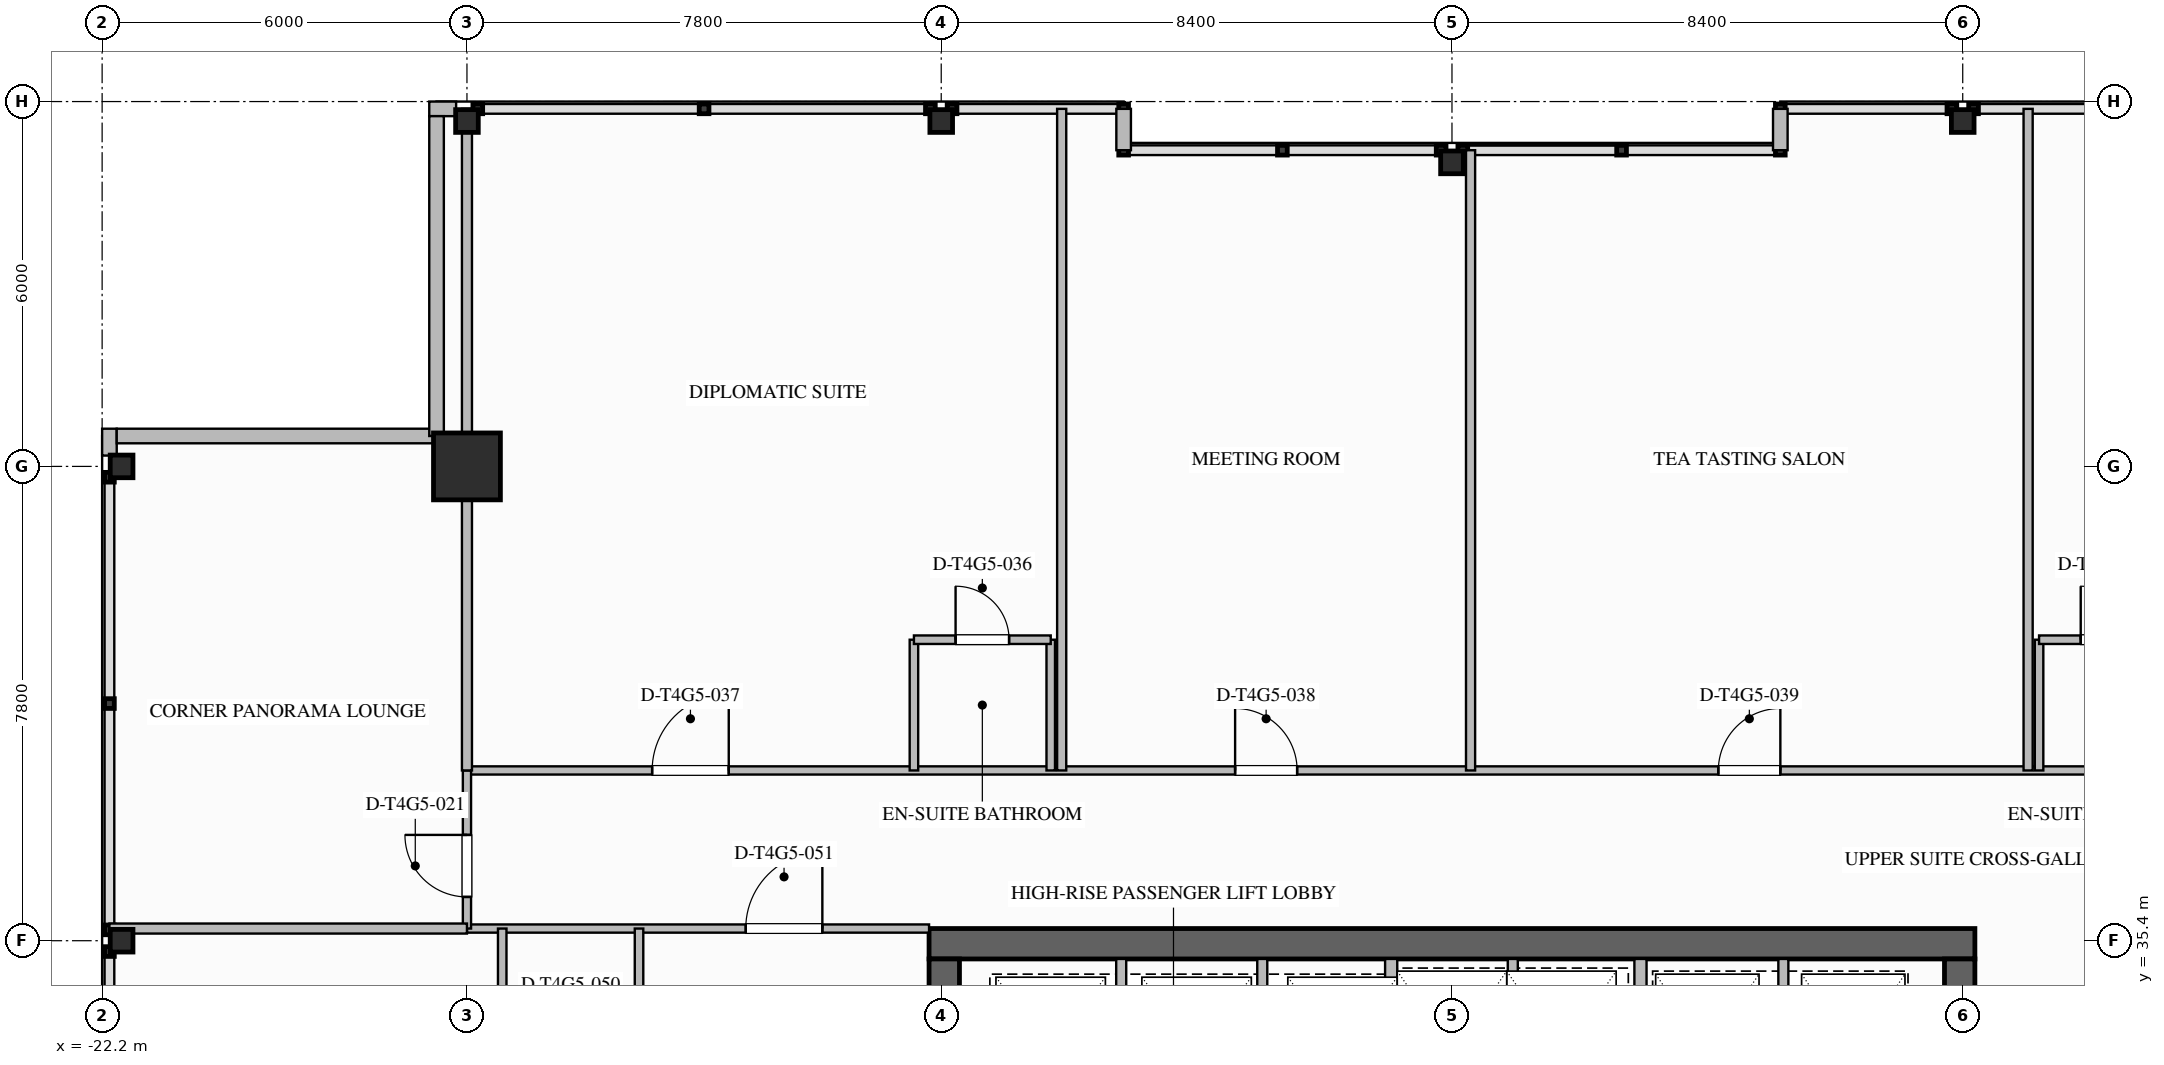
"""IFC4 building model, lengths in metres.
Left out: names, types, materials, properties, quantities, classifications, styles, units other than length and angle.
Written with IfcOpenShell. Run it as: python <this file> out.ifc"""

import sys

from ifc_helpers import new_model, si_unit, direction, frame, frame_2d, origin, origin_2d, place, context, subcontext, project, spatial, rectangle, i_section, extrude, element, fill, save


model = new_model("IFC4")
c1 = context("Model", 3, precision=1e-05, world=origin(), true_north=direction((0.0, 1.0)))
c2 = subcontext(c1, "Body", "Model", "MODEL_VIEW")
j1 = project(units=[si_unit("LENGTHUNIT", "METRE"), si_unit("PLANEANGLEUNIT", "RADIAN")], contexts=[c1])
p1 = place(None, origin())
s1 = spatial("IfcSite", under=j1, at=p1, CompositionType="ELEMENT")
p2 = place(p1, origin())
s2 = spatial("IfcBuilding", under=s1, at=p2, CompositionType="ELEMENT")
p3 = place(p2, frame((0.0, 0.0, 248.3)))
s3 = spatial("IfcBuildingStorey", under=s2, at=p3, CompositionType="ELEMENT", Elevation=248.3)
p4 = place(p3, frame((-8.6, 35.35, 0.0), z_axis=(0.0, 0.0, 1.0), x_axis=(1.0, 0.0, 0.0)))
e1 = element("IfcWall", 1, at=p4, inside=s3, PredefinedType="SHEAR", context=c2, shape_type="SweptSolid", body=[
    extrude(rectangle(XDim=17.2, YDim=0.5, at=frame_2d((8.6, 0.0))), origin(), (0.0, 0.0, 1.0), 3.6),
])
p5 = place(p3, frame((8.35, 35.1, 0.0), z_axis=(0.0, 0.0, 1.0), x_axis=(0.0, -1.0, 0.0)))
e2 = element("IfcWall", 2, at=p5, inside=s3, PredefinedType="SHEAR", context=c2, shape_type="SweptSolid", body=[
    extrude(rectangle(XDim=16.2, YDim=0.5, at=frame_2d((8.1, 0.0))), origin(), (0.0, 0.0, 1.0), 3.6),
])
p6 = place(p5, frame((3.08, 0.0, 0.0)))
e3 = element("IfcOpeningElement", 3, at=p6, cuts=e2, PredefinedType="OPENING", context=c2, shape_type="SweptSolid", body=[
    extrude(rectangle(XDim=1.12, YDim=2.1, at=frame_2d((0.56, 1.05))), frame((0.0, 0.26, 0.0), z_axis=(0.0, -1.0, 0.0), x_axis=(1.0, 0.0, 0.0)), (0.0, 0.0, 1.0), 0.52),
])
p7 = place(p5, frame((10.62, 0.0, 0.0)))
e4 = element("IfcOpeningElement", 4, at=p7, cuts=e2, PredefinedType="OPENING", context=c2, shape_type="SweptSolid", body=[
    extrude(rectangle(XDim=1.08, YDim=2.04, at=frame_2d((0.54, 1.02))), frame((0.0, 0.26, 0.0), z_axis=(0.0, -1.0, 0.0), x_axis=(1.0, 0.0, 0.0)), (0.0, 0.0, 1.0), 0.52),
])
p8 = place(p3, frame((-8.35, 18.9, 0.0), z_axis=(0.0, 0.0, 1.0), x_axis=(0.0, 1.0, 0.0)))
e5 = element("IfcWall", 5, at=p8, inside=s3, PredefinedType="SHEAR", context=c2, shape_type="SweptSolid", body=[
    extrude(rectangle(XDim=16.2, YDim=0.5, at=frame_2d((8.1, 0.0))), origin(), (0.0, 0.0, 1.0), 3.6),
])
p9 = place(p3, frame((-16.2, 43.2, 0.0), z_axis=(0.0, 0.0, 1.0), x_axis=(1.0, 0.0, 0.0)))
e6 = element("IfcColumn", 6, at=p9, inside=s3, PredefinedType="COLUMN", context=c2, shape_type="SweptSolid", body=[
    extrude(rectangle(XDim=1.1, YDim=1.1, at=origin_2d()), origin(), (0.0, 0.0, 1.0), 3.6),
])
for number, where, z_axis, x_axis in (
    (7, (-21.88, 35.4, 0.0), (0.0, 0.0, 1.0), (1.0, 0.0, 0.0)),
    (8, (-21.88, 43.2, 0.0), (0.0, 0.0, 1.0), (1.0, 0.0, 0.0)),
    (9, (-16.2, 48.88, 0.0), (0.0, 0.0, 1.0), (0.0, 1.0, 0.0)),
    (10, (-8.4, 48.88, 0.0), (0.0, 0.0, 1.0), (0.0, 1.0, 0.0)),
    (11, (0.0, 48.2, 0.0), (0.0, 0.0, 1.0), (0.0, 1.0, 0.0)),
    (12, (8.4, 48.88, 0.0), (0.0, 0.0, 1.0), (0.0, 1.0, 0.0)),
):
    element("IfcColumn", number, at=place(p3, frame(where, z_axis=z_axis, x_axis=x_axis)), inside=s3, PredefinedType="COLUMN", context=c2, shape_type="SweptSolid", body=[
        extrude(i_section(OverallWidth=0.374, OverallDepth=0.372, WebThickness=0.016, FlangeThickness=0.026, FilletRadius=0.025, at=origin_2d()), origin(), (0.0, 0.0, 1.0), 3.597),
    ])
for number, where, z_axis, x_axis in (
    (13, (-22.08, 43.378, 0.0), (0.0, 0.0, 1.0), (0.0, 1.0, 0.0)),
    (14, (-16.82, 49.08, 0.0), (0.0, 0.0, 1.0), (1.0, 0.0, 0.0)),
):
    element("IfcWall", number, at=place(p3, frame(where, z_axis=z_axis, x_axis=x_axis)), inside=s3, PredefinedType="STANDARD", context=c2, shape_type="SweptSolid", body=[
        extrude(rectangle(XDim=0.442, YDim=0.24, at=frame_2d((0.221, 0.0))), origin(), (0.0, 0.0, 1.0), 3.34),
    ])
for number, where, z_axis, x_axis in (
    (15, (-21.96, 43.7, 0.0), (0.0, 0.0, 1.0), (1.0, 0.0, 0.0)),
    (16, (-16.7, 43.7, 0.0), (0.0, 0.0, 1.0), (0.0, 1.0, 0.0)),
):
    element("IfcWall", number, at=place(p3, frame(where, z_axis=z_axis, x_axis=x_axis)), inside=s3, PredefinedType="STANDARD", context=c2, shape_type="SweptSolid", body=[
        extrude(rectangle(XDim=5.26, YDim=0.24, at=frame_2d((2.63, 0.0))), origin(), (0.0, 0.0, 1.0), 3.34),
    ])
for number, where, z_axis, x_axis in (
    (17, (-5.4, 49.08, 0.0), (0.0, 0.0, 1.0), (0.0, -1.0, 0.0)),
    (18, (5.4, 48.4, 0.0), (0.0, 0.0, 1.0), (0.0, 1.0, 0.0)),
):
    element("IfcWall", number, at=place(p3, frame(where, z_axis=z_axis, x_axis=x_axis)), inside=s3, PredefinedType="STANDARD", context=c2, shape_type="SweptSolid", body=[
        extrude(rectangle(XDim=0.68, YDim=0.24, at=frame_2d((0.34, 0.0))), origin(), (0.0, 0.0, 1.0), 3.34),
    ])
p10 = place(p3, frame((3.1, 32.22, 0.0), z_axis=(0.0, 0.0, 1.0), x_axis=(0.0, 1.0, 0.0)))
e19 = element("IfcWall", 19, at=p10, inside=s3, PredefinedType="SOLIDWALL", context=c2, shape_type="SweptSolid", body=[
    extrude(rectangle(XDim=2.88, YDim=0.2, at=frame_2d((1.44, 0.0))), origin(), (0.0, 0.0, 1.0), 3.34),
])
p11 = place(p3, frame((5.45, 32.22, 0.0), z_axis=(0.0, 0.0, 1.0), x_axis=(0.0, 1.0, 0.0)))
e20 = element("IfcWall", 20, at=p11, inside=s3, PredefinedType="PARTITIONING", context=c2, shape_type="SweptSolid", body=[
    extrude(rectangle(XDim=2.88, YDim=0.165, at=frame_2d((1.44, 0.0))), origin(), (0.0, 0.0, 1.0), 3.34),
])
p12 = place(p3, frame((-1.0, 32.18, 0.0), z_axis=(0.0, 0.0, 1.0), x_axis=(0.0, 1.0, 0.0)))
e21 = element("IfcWall", 21, at=p12, inside=s3, PredefinedType="SOLIDWALL", context=c2, shape_type="SweptSolid", body=[
    extrude(rectangle(XDim=2.92, YDim=0.2, at=frame_2d((1.46, 0.0))), origin(), (0.0, 0.0, 1.0), 3.34),
])
p13 = place(p3, frame((1.0, 32.18, 0.0), z_axis=(0.0, 0.0, 1.0), x_axis=(0.0, 1.0, 0.0)))
e22 = element("IfcWall", 22, at=p13, inside=s3, PredefinedType="PARTITIONING", context=c2, shape_type="SweptSolid", body=[
    extrude(rectangle(XDim=2.92, YDim=0.165, at=frame_2d((1.46, 0.0))), origin(), (0.0, 0.0, 1.0), 3.34),
])
for number, where, z_axis, x_axis in (
    (23, (-5.44, 32.22, 0.0), (0.0, 0.0, 1.0), (0.0, 1.0, 0.0)),
    (24, (-3.12, 32.22, 0.0), (0.0, 0.0, 1.0), (0.0, 1.0, 0.0)),
):
    element("IfcWall", number, at=place(p3, frame(where, z_axis=z_axis, x_axis=x_axis)), inside=s3, PredefinedType="PARTITIONING", context=c2, shape_type="SweptSolid", body=[
        extrude(rectangle(XDim=2.88, YDim=0.165, at=frame_2d((1.44, 0.0))), origin(), (0.0, 0.0, 1.0), 3.34),
    ])
p14 = place(p3, frame((-16.2, 38.2, 0.0), z_axis=(0.0, 0.0, 1.0), x_axis=(1.0, 0.0, 0.0)))
e25 = element("IfcWall", 25, at=p14, inside=s3, PredefinedType="PARTITIONING", context=c2, shape_type="SweptSolid", body=[
    extrude(rectangle(XDim=38.28, YDim=0.135, at=frame_2d((19.14, 0.0))), origin(), (0.0, 0.0, 1.0), 3.34),
])
p15 = place(p14, frame((35.785, 0.0, 0.0)))
e26 = element("IfcOpeningElement", 26, at=p15, cuts=e25, PredefinedType="OPENING", context=c2, shape_type="SweptSolid", body=[
    extrude(rectangle(XDim=1.26, YDim=2.2, at=frame_2d((0.63, 1.1))), frame((0.0, 0.077, 0.0), z_axis=(0.0, -1.0, 0.0), x_axis=(1.0, 0.0, 0.0)), (0.0, 0.0, 1.0), 0.155),
])
p16 = place(p14, frame((3.046, 0.0, 0.0)))
e27 = element("IfcOpeningElement", 27, at=p16, cuts=e25, PredefinedType="OPENING", context=c2, shape_type="SweptSolid", body=[
    extrude(rectangle(XDim=1.26, YDim=2.2, at=frame_2d((0.63, 1.1))), frame((0.0, 0.077, 0.0), z_axis=(0.0, -1.0, 0.0), x_axis=(1.0, 0.0, 0.0)), (0.0, 0.0, 1.0), 0.155),
])
p17 = place(p14, frame((12.633, 0.0, 0.0)))
e28 = element("IfcOpeningElement", 28, at=p17, cuts=e25, PredefinedType="OPENING", context=c2, shape_type="SweptSolid", body=[
    extrude(rectangle(XDim=1.02, YDim=2.15, at=frame_2d((0.51, 1.075))), frame((0.0, 0.077, 0.0), z_axis=(0.0, -1.0, 0.0), x_axis=(1.0, 0.0, 0.0)), (0.0, 0.0, 1.0), 0.155),
])
p18 = place(p14, frame((20.581, 0.0, 0.0)))
e29 = element("IfcOpeningElement", 29, at=p18, cuts=e25, PredefinedType="OPENING", context=c2, shape_type="SweptSolid", body=[
    extrude(rectangle(XDim=1.02, YDim=2.15, at=frame_2d((0.51, 1.075))), frame((0.0, 0.077, 0.0), z_axis=(0.0, -1.0, 0.0), x_axis=(1.0, 0.0, 0.0)), (0.0, 0.0, 1.0), 0.155),
])
p19 = place(p14, frame((29.623, 0.0, 0.0)))
e30 = element("IfcOpeningElement", 30, at=p19, cuts=e25, PredefinedType="OPENING", context=c2, shape_type="SweptSolid", body=[
    extrude(rectangle(XDim=1.26, YDim=2.2, at=frame_2d((0.63, 1.1))), frame((0.0, 0.077, 0.0), z_axis=(0.0, -1.0, 0.0), x_axis=(1.0, 0.0, 0.0)), (0.0, 0.0, 1.0), 0.155),
])
p20 = place(p3, frame((-16.2, 35.6, 0.0), z_axis=(0.0, 0.0, 1.0), x_axis=(1.0, 0.0, 0.0)))
e31 = element("IfcWall", 31, at=p20, inside=s3, PredefinedType="PARTITIONING", context=c2, shape_type="SweptSolid", body=[
    extrude(rectangle(XDim=7.6, YDim=0.135, at=frame_2d((3.8, 0.0))), origin(), (0.0, 0.0, 1.0), 2.717),
])
p21 = place(p20, frame((4.585, 0.0, 0.0)))
e32 = element("IfcOpeningElement", 32, at=p21, cuts=e31, PredefinedType="OPENING", context=c2, shape_type="SweptSolid", body=[
    extrude(rectangle(XDim=1.26, YDim=2.2, at=frame_2d((0.63, 1.1))), frame((0.0, 0.077, 0.0), z_axis=(0.0, -1.0, 0.0), x_axis=(1.0, 0.0, 0.0)), (0.0, 0.0, 1.0), 0.155),
])
p22 = place(p3, frame((-16.2, 35.6, 0.0), z_axis=(0.0, 0.0, 1.0), x_axis=(0.0, 1.0, 0.0)))
e33 = element("IfcWall", 33, at=p22, inside=s3, PredefinedType="PARTITIONING", context=c2, shape_type="SweptSolid", body=[
    extrude(rectangle(XDim=2.6, YDim=0.135, at=frame_2d((1.3, 0.0))), origin(), (0.0, 0.0, 1.0), 2.714),
])
p23 = place(p22, frame((0.52, 0.0, 0.0)))
e34 = element("IfcOpeningElement", 34, at=p23, cuts=e33, PredefinedType="OPENING", context=c2, shape_type="SweptSolid", body=[
    extrude(rectangle(XDim=1.02, YDim=2.15, at=frame_2d((0.51, 1.075))), frame((0.0, 0.077, 0.0), z_axis=(0.0, -1.0, 0.0), x_axis=(1.0, 0.0, 0.0)), (0.0, 0.0, 1.0), 0.155),
])
p24 = place(p3, frame((-16.2, 38.2, 0.0), z_axis=(0.0, 0.0, 1.0), x_axis=(0.0, 1.0, 0.0)))
e35 = element("IfcWall", 35, at=p24, inside=s3, PredefinedType="PARTITIONING", context=c2, shape_type="SweptSolid", body=[
    extrude(rectangle(XDim=10.88, YDim=0.165, at=frame_2d((5.44, 0.0))), origin(), (0.0, 0.0, 1.0), 2.714),
])
p25 = place(p3, frame((-22.08, 35.6, 0.0), z_axis=(0.0, 0.0, 1.0), x_axis=(1.0, 0.0, 0.0)))
e36 = element("IfcWall", 36, at=p25, inside=s3, PredefinedType="PARTITIONING", context=c2, shape_type="SweptSolid", body=[
    extrude(rectangle(XDim=5.88, YDim=0.165, at=frame_2d((2.94, 0.0))), origin(), (0.0, 0.0, 1.0), 2.714),
])
for number, where, z_axis, x_axis in (
    (37, (-8.849, 38.2, 0.0), (0.0, 0.0, 1.0), (0.0, 1.0, 0.0)),
    (38, (-6.599, 38.2, 0.0), (0.0, 0.0, 1.0), (0.0, 1.0, 0.0)),
):
    element("IfcWall", number, at=place(p3, frame(where, z_axis=z_axis, x_axis=x_axis)), inside=s3, PredefinedType="PLUMBINGWALL", context=c2, shape_type="SweptSolid", body=[
        extrude(rectangle(XDim=2.15, YDim=0.14, at=frame_2d((1.075, 0.0))), origin(), (0.0, 0.0, 1.0), 3.34),
    ])
p26 = place(p3, frame((-8.849, 40.35, 0.0), z_axis=(0.0, 0.0, 1.0), x_axis=(1.0, 0.0, 0.0)))
e39 = element("IfcWall", 39, at=p26, inside=s3, PredefinedType="PLUMBINGWALL", context=c2, shape_type="SweptSolid", body=[
    extrude(rectangle(XDim=2.25, YDim=0.14, at=frame_2d((1.125, 0.0))), origin(), (0.0, 0.0, 1.0), 3.34),
])
p27 = place(p26, frame((0.685, 0.0, 0.0)))
e40 = element("IfcOpeningElement", 40, at=p27, cuts=e39, PredefinedType="OPENING", context=c2, shape_type="SweptSolid", body=[
    extrude(rectangle(XDim=0.88, YDim=2.1, at=frame_2d((0.44, 1.05))), frame((0.0, 0.08, 0.0), z_axis=(0.0, -1.0, 0.0), x_axis=(1.0, 0.0, 0.0)), (0.0, 0.0, 1.0), 0.16),
])
p28 = place(p3, frame((-6.419, 38.2, 0.0), z_axis=(0.0, 0.0, 1.0), x_axis=(0.0, 1.0, 0.0)))
e41 = element("IfcWall", 41, at=p28, inside=s3, PredefinedType="PARTITIONING", context=c2, shape_type="SweptSolid", body=[
    extrude(rectangle(XDim=10.88, YDim=0.15, at=frame_2d((5.44, 0.0))), origin(), (0.0, 0.0, 1.0), 3.34),
])
p29 = place(p3, frame((0.306, 38.2, 0.0), z_axis=(0.0, 0.0, 1.0), x_axis=(0.0, 1.0, 0.0)))
e42 = element("IfcWall", 42, at=p29, inside=s3, PredefinedType="PARTITIONING", context=c2, shape_type="SweptSolid", body=[
    extrude(rectangle(XDim=10.2, YDim=0.15, at=frame_2d((5.1, 0.0))), origin(), (0.0, 0.0, 1.0), 2.714),
])
p30 = place(p3, frame((9.476, 38.2, 0.0), z_axis=(0.0, 0.0, 1.0), x_axis=(0.0, 1.0, 0.0)))
e43 = element("IfcWall", 43, at=p30, inside=s3, PredefinedType="PARTITIONING", context=c2, shape_type="SweptSolid", body=[
    extrude(rectangle(XDim=10.88, YDim=0.15, at=frame_2d((5.44, 0.0))), origin(), (0.0, 0.0, 1.0), 3.34),
])
p31 = place(p3, frame((9.656, 38.2, 0.0), z_axis=(0.0, 0.0, 1.0), x_axis=(0.0, 1.0, 0.0)))
e44 = element("IfcWall", 44, at=p31, inside=s3, PredefinedType="PLUMBINGWALL", context=c2, shape_type="SweptSolid", body=[
    extrude(rectangle(XDim=2.15, YDim=0.14, at=frame_2d((1.075, 0.0))), origin(), (0.0, 0.0, 1.0), 3.34),
])
p32 = place(p3, frame((9.656, 40.35, 0.0), z_axis=(0.0, 0.0, 1.0), x_axis=(1.0, 0.0, 0.0)))
e45 = element("IfcWall", 45, at=p32, inside=s3, PredefinedType="PLUMBINGWALL", context=c2, shape_type="SweptSolid", body=[
    extrude(rectangle(XDim=2.25, YDim=0.14, at=frame_2d((1.125, 0.0))), origin(), (0.0, 0.0, 1.0), 3.34),
])
p33 = place(p32, frame((0.685, 0.0, 0.0)))
e46 = element("IfcOpeningElement", 46, at=p33, cuts=e45, PredefinedType="OPENING", context=c2, shape_type="SweptSolid", body=[
    extrude(rectangle(XDim=0.88, YDim=2.1, at=frame_2d((0.44, 1.05))), frame((0.0, 0.08, 0.0), z_axis=(0.0, -1.0, 0.0), x_axis=(1.0, 0.0, 0.0)), (0.0, 0.0, 1.0), 0.16),
])
for number, where, z_axis, x_axis in (
    (47, (-15.62, 35.6, 0.0), (0.0, 0.0, 1.0), (0.0, -1.0, 0.0)),
    (48, (-13.37, 35.6, 0.0), (0.0, 0.0, 1.0), (0.0, -1.0, 0.0)),
):
    element("IfcWall", number, at=place(p3, frame(where, z_axis=z_axis, x_axis=x_axis)), inside=s3, PredefinedType="PLUMBINGWALL", context=c2, shape_type="SweptSolid", body=[
        extrude(rectangle(XDim=2.15, YDim=0.14, at=frame_2d((1.075, 0.0))), origin(), (0.0, 0.0, 1.0), 3.34),
    ])
p34 = place(p23, origin())
e49 = element("IfcDoor", 49, at=p34, inside=s3, OperationType="SINGLE_SWING_RIGHT", PredefinedType="DOOR", context=c2, shape_type="SweptSolid", body=[
    extrude(rectangle(XDim=1.02, YDim=2.15, at=frame_2d((0.51, 1.075))), frame((0.0, 0.025, 0.0), z_axis=(0.0, -1.0, 0.0), x_axis=(1.0, 0.0, 0.0)), (0.0, 0.0, 1.0), 0.05),
])
fill(e34, e49)
p35 = place(p27, origin())
e50 = element("IfcDoor", 50, at=p35, inside=s3, OperationType="SINGLE_SWING_LEFT", PredefinedType="DOOR", context=c2, shape_type="SweptSolid", body=[
    extrude(rectangle(XDim=0.88, YDim=2.1, at=frame_2d((0.44, 1.05))), frame((0.0, 0.025, 0.0), z_axis=(0.0, -1.0, 0.0), x_axis=(1.0, 0.0, 0.0)), (0.0, 0.0, 1.0), 0.05),
])
fill(e40, e50)
p36 = place(p16, origin())
e51 = element("IfcDoor", 51, at=p36, inside=s3, OperationType="SINGLE_SWING_RIGHT", PredefinedType="DOOR", context=c2, shape_type="SweptSolid", body=[
    extrude(rectangle(XDim=1.26, YDim=2.2, at=frame_2d((0.63, 1.1))), frame((0.0, 0.025, 0.0), z_axis=(0.0, -1.0, 0.0), x_axis=(1.0, 0.0, 0.0)), (0.0, 0.0, 1.0), 0.05),
])
fill(e27, e51)
p37 = place(p17, origin())
e52 = element("IfcDoor", 52, at=p37, inside=s3, OperationType="SINGLE_SWING_LEFT", PredefinedType="DOOR", context=c2, shape_type="SweptSolid", body=[
    extrude(rectangle(XDim=1.02, YDim=2.15, at=frame_2d((0.51, 1.075))), frame((0.0, 0.025, 0.0), z_axis=(0.0, -1.0, 0.0), x_axis=(1.0, 0.0, 0.0)), (0.0, 0.0, 1.0), 0.05),
])
fill(e28, e52)
p38 = place(p18, origin())
e53 = element("IfcDoor", 53, at=p38, inside=s3, OperationType="SINGLE_SWING_RIGHT", PredefinedType="DOOR", context=c2, shape_type="SweptSolid", body=[
    extrude(rectangle(XDim=1.02, YDim=2.15, at=frame_2d((0.51, 1.075))), frame((0.0, 0.025, 0.0), z_axis=(0.0, -1.0, 0.0), x_axis=(1.0, 0.0, 0.0)), (0.0, 0.0, 1.0), 0.05),
])
fill(e29, e53)
p39 = place(p33, origin())
e54 = element("IfcDoor", 54, at=p39, inside=s3, OperationType="SINGLE_SWING_LEFT", PredefinedType="DOOR", context=c2, shape_type="SweptSolid", body=[
    extrude(rectangle(XDim=0.88, YDim=2.1, at=frame_2d((0.44, 1.05))), frame((0.0, 0.025, 0.0), z_axis=(0.0, -1.0, 0.0), x_axis=(1.0, 0.0, 0.0)), (0.0, 0.0, 1.0), 0.05),
])
fill(e46, e54)
p40 = place(p21, origin())
e55 = element("IfcDoor", 55, at=p40, inside=s3, OperationType="SINGLE_SWING_RIGHT", PredefinedType="DOOR", context=c2, shape_type="SweptSolid", body=[
    extrude(rectangle(XDim=1.26, YDim=2.2, at=frame_2d((0.63, 1.1))), frame((0.0, 0.025, 0.0), z_axis=(0.0, -1.0, 0.0), x_axis=(1.0, 0.0, 0.0)), (0.0, 0.0, 1.0), 0.05),
])
fill(e32, e55)
save(model, sys.argv[1])
